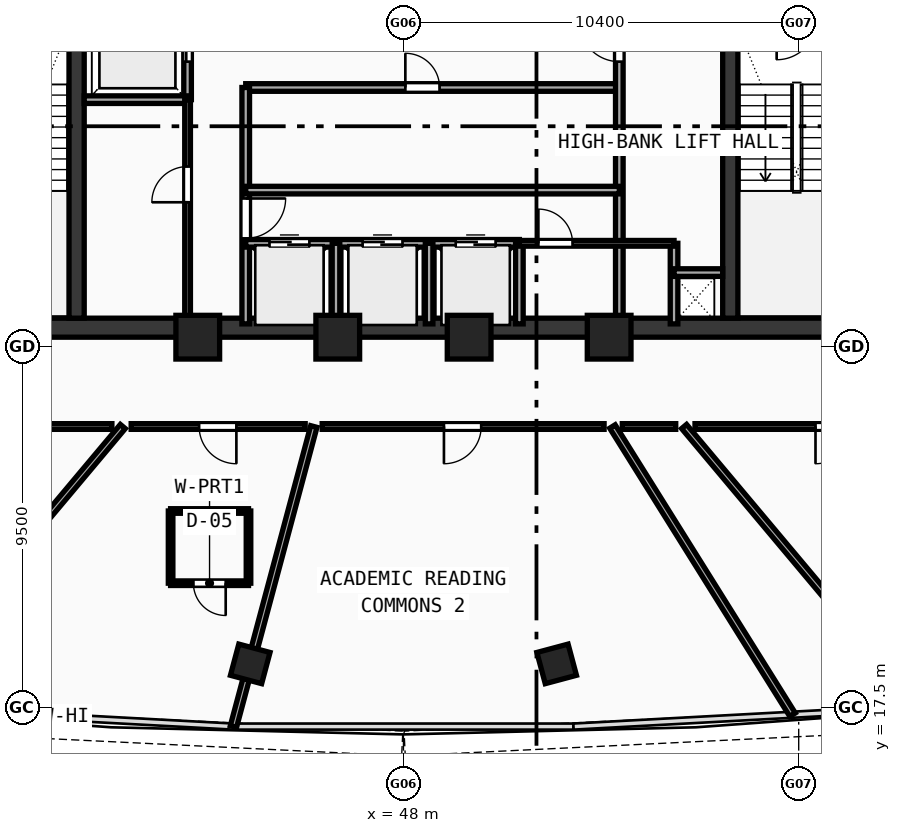
"""IFC4 building model, lengths in metres.
Left out: names, types, materials, properties, quantities, classifications, styles, units other than length and angle.
Written with IfcOpenShell. Run it as: python <this file> out.ifc"""

import sys

from ifc_helpers import new_model, si_unit, direction, frame, frame_2d, origin, origin_with_axes, origin_2d, place, context, subcontext, project, spatial, rectangle, hollow_rectangle, extrude, source, transform, mapped, element, fill, save


model = new_model("IFC4")
c1 = context("Model", 3, precision=1e-05, world=origin(), true_north=direction((0.0, 1.0)))
c2 = subcontext(c1, "Body", "Model", "MODEL_VIEW")
j1 = project(units=[si_unit("LENGTHUNIT", "METRE"), si_unit("PLANEANGLEUNIT", "RADIAN")], contexts=[c1])
p1 = place(None, origin())
s1 = spatial("IfcSite", under=j1, at=p1, CompositionType="ELEMENT")
p2 = place(p1, origin())
s2 = spatial("IfcBuilding", under=s1, at=p2, CompositionType="ELEMENT")
p3 = place(p2, frame((0.0, 0.0, 255.72)))
s3 = spatial("IfcBuildingStorey", under=s2, at=p3, CompositionType="ELEMENT", Elevation=255.72)
p4 = place(p3, frame((35.55, 27.5, 0.0), z_axis=(0.0, 0.0, 1.0), x_axis=(1.0, 0.0, 0.0)))
e1 = element("IfcWall", 1, at=p4, inside=s3, PredefinedType="SHEAR", context=c2, shape_type="SweptSolid", body=[
    extrude(rectangle(XDim=24.9, YDim=0.5, at=frame_2d((12.45, 0.0))), origin(), (0.0, 0.0, 1.0), 3.47),
])
p5 = place(p3, frame((39.4, 27.75, 0.0), z_axis=(0.0, 0.0, 1.0), x_axis=(0.0, 1.0, 0.0)))
e2 = element("IfcWall", 2, at=p5, inside=s3, PredefinedType="SHEAR", context=c2, shape_type="SweptSolid", body=[
    extrude(rectangle(XDim=12.2, YDim=0.4, at=frame_2d((6.1, 0.0))), origin(), (0.0, 0.0, 1.0), 3.47),
])
p6 = place(p5, frame((10.0, 0.0, 0.0)))
e3 = element("IfcOpeningElement", 3, at=p6, cuts=e2, PredefinedType="OPENING", context=c2, shape_type="SweptSolid", body=[
    extrude(rectangle(XDim=1.1, YDim=2.1, at=frame_2d((0.55, 1.05))), frame((0.0, 0.21, 0.0), z_axis=(0.0, -1.0, 0.0), x_axis=(1.0, 0.0, 0.0)), (0.0, 0.0, 1.0), 0.42),
])
p7 = place(p3, frame((56.6, 27.75, 0.0), z_axis=(0.0, 0.0, 1.0), x_axis=(0.0, 1.0, 0.0)))
e4 = element("IfcWall", 4, at=p7, inside=s3, PredefinedType="SHEAR", context=c2, shape_type="SweptSolid", body=[
    extrude(rectangle(XDim=12.2, YDim=0.4, at=frame_2d((6.1, 0.0))), origin(), (0.0, 0.0, 1.0), 3.47),
])
p8 = place(p7, frame((10.0, 0.0, 0.0)))
e5 = element("IfcOpeningElement", 5, at=p8, cuts=e4, PredefinedType="OPENING", context=c2, shape_type="SweptSolid", body=[
    extrude(rectangle(XDim=1.1, YDim=2.1, at=frame_2d((0.55, 1.05))), frame((0.0, 0.21, 0.0), z_axis=(0.0, -1.0, 0.0), x_axis=(1.0, 0.0, 0.0)), (0.0, 0.0, 1.0), 0.42),
])
m1 = source(origin(), c2, "Body", "SweptSolid", [
    extrude(hollow_rectangle(XDim=1.15, YDim=1.15, WallThickness=0.048, at=origin_2d()), origin(), (0.0, 0.0, 1.0), 3.73),
])
for number, where, z_axis, x_axis in (
    (6, (42.588, 27.25, -0.26), (0.0, 0.0, 1.0), (1.0, 0.0, 0.0)),
    (7, (46.272, 27.25, -0.26), (0.0, 0.0, 1.0), (1.0, 0.0, 0.0)),
    (8, (49.729, 27.25, -0.26), (0.0, 0.0, 1.0), (1.0, 0.0, 0.0)),
    (9, (53.412, 27.25, -0.26), (0.0, 0.0, 1.0), (1.0, 0.0, 0.0)),
):
    element("IfcColumn", number, at=place(p3, frame(where, z_axis=z_axis, x_axis=x_axis)), inside=s3, PredefinedType="COLUMN", context=c2, shape_type="MappedRepresentation", body=[
        mapped(m1, transform((0.0, 0.0, 0.0), scale=1.0)),
    ])
m2 = source(origin(), c2, "Body", "SweptSolid", [
    extrude(hollow_rectangle(XDim=0.85, YDim=0.85, WallThickness=0.034, at=origin_2d()), origin(), (0.0, 0.0, 1.0), 3.73),
])
for number, where, z_axis, x_axis in (
    (10, (43.969, 18.654, -0.26), (0.0, 0.0, 1.0), (0.966, -0.259, 0.0)),
    (11, (52.031, 18.654, -0.26), (0.0, 0.0, 1.0), (0.966, 0.259, 0.0)),
):
    element("IfcColumn", number, at=place(p3, frame(where, z_axis=z_axis, x_axis=x_axis)), inside=s3, PredefinedType="COLUMN", context=c2, shape_type="MappedRepresentation", body=[
        mapped(m2, transform((0.0, 0.0, 0.0), scale=1.0)),
    ])
p9 = place(p3, frame((42.32, 33.5, 0.0), z_axis=(0.0, 0.0, 1.0), x_axis=(0.0, 1.0, 0.0)))
e12 = element("IfcWall", 12, at=p9, inside=s3, PredefinedType="SOLIDWALL", context=c2, shape_type="SweptSolid", body=[
    extrude(rectangle(XDim=6.45, YDim=0.2, at=frame_2d((3.225, 0.0))), origin(), (0.0, 0.0, 1.0), 3.47),
])
p10 = place(p9, frame((1.0, 0.0, 0.0)))
e13 = element("IfcOpeningElement", 13, at=p10, cuts=e12, PredefinedType="OPENING", context=c2, shape_type="SweptSolid", body=[
    extrude(rectangle(XDim=1.05, YDim=2.1, at=frame_2d((0.525, 1.05))), frame((0.0, 0.11, 0.0), z_axis=(0.0, -1.0, 0.0), x_axis=(1.0, 0.0, 0.0)), (0.0, 0.0, 1.0), 0.22),
])
p11 = place(p3, frame((39.6, 33.5, 0.0), z_axis=(0.0, 0.0, 1.0), x_axis=(1.0, 0.0, 0.0)))
e14 = element("IfcWall", 14, at=p11, inside=s3, PredefinedType="SOLIDWALL", context=c2, shape_type="SweptSolid", body=[
    extrude(rectangle(XDim=2.72, YDim=0.2, at=frame_2d((1.36, 0.0))), origin(), (0.0, 0.0, 1.0), 3.47),
])
p12 = place(p3, frame((43.85, 33.82, 0.0), z_axis=(0.0, 0.0, 1.0), x_axis=(1.0, 0.0, 0.0)))
e15 = element("IfcWall", 15, at=p12, inside=s3, PredefinedType="SOLIDWALL", context=c2, shape_type="SweptSolid", body=[
    extrude(rectangle(XDim=9.83, YDim=0.2, at=frame_2d((4.915, 0.0))), origin(), (0.0, 0.0, 1.0), 3.47),
])
p13 = place(p12, frame((4.2, 0.0, 0.0)))
e16 = element("IfcOpeningElement", 16, at=p13, cuts=e15, PredefinedType="OPENING", context=c2, shape_type="SweptSolid", body=[
    extrude(rectangle(XDim=0.9, YDim=2.1, at=frame_2d((0.45, 1.05))), frame((0.0, 0.11, 0.0), z_axis=(0.0, -1.0, 0.0), x_axis=(1.0, 0.0, 0.0)), (0.0, 0.0, 1.0), 0.22),
])
p14 = place(p3, frame((43.85, 27.6, 0.0), z_axis=(0.0, 0.0, 1.0), x_axis=(0.0, 1.0, 0.0)))
e17 = element("IfcWall", 17, at=p14, inside=s3, PredefinedType="SOLIDWALL", context=c2, shape_type="SweptSolid", body=[
    extrude(rectangle(XDim=6.22, YDim=0.2, at=frame_2d((3.11, 0.0))), origin(), (0.0, 0.0, 1.0), 3.47),
])
p15 = place(p14, frame((2.25, 0.0, 0.0)))
e18 = element("IfcOpeningElement", 18, at=p15, cuts=e17, PredefinedType="OPENING", context=c2, shape_type="SweptSolid", body=[
    extrude(rectangle(XDim=1.05, YDim=2.1, at=frame_2d((0.525, 1.05))), frame((0.0, 0.11, 0.0), z_axis=(0.0, -1.0, 0.0), x_axis=(1.0, 0.0, 0.0)), (0.0, 0.0, 1.0), 0.22),
])
p16 = place(p3, frame((53.68, 27.6, 0.0), z_axis=(0.0, 0.0, 1.0), x_axis=(0.0, 1.0, 0.0)))
e19 = element("IfcWall", 19, at=p16, inside=s3, PredefinedType="SOLIDWALL", context=c2, shape_type="SweptSolid", body=[
    extrude(rectangle(XDim=9.05, YDim=0.2, at=frame_2d((4.525, 0.0))), origin(), (0.0, 0.0, 1.0), 3.47),
])
p17 = place(p16, frame((6.9, 0.0, 0.0)))
e20 = element("IfcOpeningElement", 20, at=p17, cuts=e19, PredefinedType="OPENING", context=c2, shape_type="SweptSolid", body=[
    extrude(rectangle(XDim=1.05, YDim=2.1, at=frame_2d((0.525, 1.05))), frame((0.0, 0.11, 0.0), z_axis=(0.0, -1.0, 0.0), x_axis=(1.0, 0.0, 0.0)), (0.0, 0.0, 1.0), 0.22),
])
p18 = place(p3, frame((43.85, 29.72, 0.0), z_axis=(0.0, 0.0, 1.0), x_axis=(1.0, 0.0, 0.0)))
e21 = element("IfcWall", 21, at=p18, inside=s3, PredefinedType="SOLIDWALL", context=c2, shape_type="SweptSolid", body=[
    extrude(rectangle(XDim=7.2, YDim=0.2, at=frame_2d((3.6, 0.0))), origin(), (0.0, 0.0, 1.0), 3.47),
])
p19 = place(p18, frame((0.625, 0.0, 0.0)))
e22 = element("IfcOpeningElement", 22, at=p19, cuts=e21, PredefinedType="OPENING", context=c2, shape_type="SweptSolid", body=[
    extrude(rectangle(XDim=1.05, YDim=2.1, at=frame_2d((0.525, 1.05))), frame((0.0, 0.11, 0.0), z_axis=(0.0, -1.0, 0.0), x_axis=(1.0, 0.0, 0.0)), (0.0, 0.0, 1.0), 0.22),
])
p20 = place(p18, frame((3.075, 0.0, 0.0)))
e23 = element("IfcOpeningElement", 23, at=p20, cuts=e21, PredefinedType="OPENING", context=c2, shape_type="SweptSolid", body=[
    extrude(rectangle(XDim=1.05, YDim=2.1, at=frame_2d((0.525, 1.05))), frame((0.0, 0.11, 0.0), z_axis=(0.0, -1.0, 0.0), x_axis=(1.0, 0.0, 0.0)), (0.0, 0.0, 1.0), 0.22),
])
p21 = place(p18, frame((5.525, 0.0, 0.0)))
e24 = element("IfcOpeningElement", 24, at=p21, cuts=e21, PredefinedType="OPENING", context=c2, shape_type="SweptSolid", body=[
    extrude(rectangle(XDim=1.05, YDim=2.1, at=frame_2d((0.525, 1.05))), frame((0.0, 0.11, 0.0), z_axis=(0.0, -1.0, 0.0), x_axis=(1.0, 0.0, 0.0)), (0.0, 0.0, 1.0), 0.22),
])
p22 = place(p3, frame((51.05, 27.6, 0.0), z_axis=(0.0, 0.0, 1.0), x_axis=(0.0, 1.0, 0.0)))
e25 = element("IfcWall", 25, at=p22, inside=s3, PredefinedType="SOLIDWALL", context=c2, shape_type="SweptSolid", body=[
    extrude(rectangle(XDim=2.12, YDim=0.2, at=frame_2d((1.06, 0.0))), origin(), (0.0, 0.0, 1.0), 3.47),
])
p23 = place(p3, frame((43.85, 31.12, 0.0), z_axis=(0.0, 0.0, 1.0), x_axis=(1.0, 0.0, 0.0)))
e26 = element("IfcWall", 26, at=p23, inside=s3, PredefinedType="SOLIDWALL", context=c2, shape_type="SweptSolid", body=[
    extrude(rectangle(XDim=9.83, YDim=0.2, at=frame_2d((4.915, 0.0))), origin(), (0.0, 0.0, 1.0), 3.47),
])
for number, where, z_axis, x_axis in (
    (27, (46.225, 27.6, 0.0), (0.0, 0.0, 1.0), (0.0, 1.0, 0.0)),
    (28, (48.675, 27.6, 0.0), (0.0, 0.0, 1.0), (0.0, 1.0, 0.0)),
    (29, (55.12, 27.6, 0.0), (0.0, 0.0, 1.0), (0.0, 1.0, 0.0)),
):
    element("IfcWall", number, at=place(p3, frame(where, z_axis=z_axis, x_axis=x_axis)), inside=s3, PredefinedType="SOLIDWALL", context=c2, shape_type="SweptSolid", body=[
        extrude(rectangle(XDim=2.12, YDim=0.2, at=frame_2d((1.06, 0.0))), origin(), (0.0, 0.0, 1.0), 3.47),
    ])
p24 = place(p3, frame((55.12, 28.95, 0.0), z_axis=(0.0, 0.0, 1.0), x_axis=(1.0, 0.0, 0.0)))
e30 = element("IfcWall", 30, at=p24, inside=s3, PredefinedType="SOLIDWALL", context=c2, shape_type="SweptSolid", body=[
    extrude(rectangle(XDim=1.28, YDim=0.2, at=frame_2d((0.64, 0.0))), origin(), (0.0, 0.0, 1.0), 3.47),
])
p25 = place(p3, frame((42.32, 27.6, 0.0), z_axis=(0.0, 0.0, 1.0), x_axis=(0.0, 1.0, 0.0)))
e31 = element("IfcWall", 31, at=p25, inside=s3, PredefinedType="PARTITIONING", context=c2, shape_type="SweptSolid", body=[
    extrude(rectangle(XDim=5.9, YDim=0.15, at=frame_2d((2.95, 0.0))), origin(), (0.0, 0.0, 1.0), 3.47),
])
p26 = place(p25, frame((3.2, 0.0, 0.0)))
e32 = element("IfcOpeningElement", 32, at=p26, cuts=e31, PredefinedType="OPENING", context=c2, shape_type="SweptSolid", body=[
    extrude(rectangle(XDim=0.94, YDim=2.1, at=frame_2d((0.47, 1.05))), frame((0.0, 0.085, 0.0), z_axis=(0.0, -1.0, 0.0), x_axis=(1.0, 0.0, 0.0)), (0.0, 0.0, 1.0), 0.17),
])
p27 = place(p3, frame((51.05, 29.72, 0.0), z_axis=(0.0, 0.0, 1.0), x_axis=(1.0, 0.0, 0.0)))
e33 = element("IfcWall", 33, at=p27, inside=s3, PredefinedType="PARTITIONING", context=c2, shape_type="SweptSolid", body=[
    extrude(rectangle(XDim=4.07, YDim=0.15, at=frame_2d((2.035, 0.0))), origin(), (0.0, 0.0, 1.0), 3.47),
])
p28 = place(p27, frame((0.5, 0.0, 0.0)))
e34 = element("IfcOpeningElement", 34, at=p28, cuts=e33, PredefinedType="OPENING", context=c2, shape_type="SweptSolid", body=[
    extrude(rectangle(XDim=0.9, YDim=2.1, at=frame_2d((0.45, 1.05))), frame((0.0, 0.085, 0.0), z_axis=(0.0, -1.0, 0.0), x_axis=(1.0, 0.0, 0.0)), (0.0, 0.0, 1.0), 0.17),
])
p29 = place(p3, frame((40.616, 24.9, 0.0), z_axis=(0.0, 0.0, 1.0), x_axis=(-0.642795010628, -0.766038232931, 0.0)))
e35 = element("IfcWall", 35, at=p29, inside=s3, PredefinedType="PARTITIONING", context=c2, shape_type="SweptSolid", body=[
    extrude(rectangle(XDim=9.663, YDim=0.17, at=frame_2d((4.832, 0.0))), origin(), (0.0, 0.0, 1.0), 2.82),
])
p30 = place(p3, frame((45.642, 24.9, 0.0), z_axis=(0.0, 0.0, 1.0), x_axis=(-0.258833622746, -0.965921920103, 0.0)))
e36 = element("IfcWall", 36, at=p30, inside=s3, PredefinedType="PARTITIONING", context=c2, shape_type="SweptSolid", body=[
    extrude(rectangle(XDim=8.174, YDim=0.17, at=frame_2d((4.087, 0.0))), origin(), (0.0, 0.0, 1.0), 2.82),
])
p31 = place(p3, frame((53.499, 24.9, 0.0), z_axis=(0.0, 0.0, 1.0), x_axis=(0.529920411872, -0.848047379031, 0.0)))
e37 = element("IfcWall", 37, at=p31, inside=s3, PredefinedType="PARTITIONING", context=c2, shape_type="SweptSolid", body=[
    extrude(rectangle(XDim=8.943, YDim=0.17, at=frame_2d((4.471, 0.0))), origin(), (0.0, 0.0, 1.0), 2.82),
])
p32 = place(p3, frame((55.384, 24.9, 0.0), z_axis=(0.0, 0.0, 1.0), x_axis=(0.642795010628, -0.766038232931, 0.0)))
e38 = element("IfcWall", 38, at=p32, inside=s3, PredefinedType="PARTITIONING", context=c2, shape_type="SweptSolid", body=[
    extrude(rectangle(XDim=9.663, YDim=0.17, at=frame_2d((4.832, 0.0))), origin(), (0.0, 0.0, 1.0), 2.82),
])
p33 = place(p3, frame((62.85, 24.9, 0.0), z_axis=(0.0, 0.0, 1.0), x_axis=(-1.0, 0.0, 0.0)))
e39 = element("IfcWall", 39, at=p33, inside=s3, PredefinedType="PARTITIONING", context=c2, shape_type="SweptSolid", body=[
    extrude(rectangle(XDim=7.179, YDim=0.15, at=frame_2d((3.589, 0.0))), origin(), (0.0, 0.0, 1.0), 3.12),
])
p34 = place(p33, frame((3.028, 0.0, 0.0)))
e40 = element("IfcOpeningElement", 40, at=p34, cuts=e39, PredefinedType="OPENING", context=c2, shape_type="SweptSolid", body=[
    extrude(rectangle(XDim=0.98, YDim=2.12, at=frame_2d((0.49, 1.06))), frame((0.0, 0.085, 0.0), z_axis=(0.0, -1.0, 0.0), x_axis=(1.0, 0.0, 0.0)), (0.0, 0.0, 1.0), 0.17),
])
p35 = place(p3, frame((55.164, 24.9, 0.0), z_axis=(0.0, 0.0, 1.0), x_axis=(-1.0, 0.0, 0.0)))
e41 = element("IfcWall", 41, at=p35, inside=s3, PredefinedType="PARTITIONING", context=c2, shape_type="SweptSolid", body=[
    extrude(rectangle(XDim=1.406, YDim=0.15, at=frame_2d((0.703, 0.0))), origin(), (0.0, 0.0, 1.0), 2.82),
])
p36 = place(p3, frame((53.279, 24.9, 0.0), z_axis=(0.0, 0.0, 1.0), x_axis=(-1.0, 0.0, 0.0)))
e42 = element("IfcWall", 42, at=p36, inside=s3, PredefinedType="PARTITIONING", context=c2, shape_type="SweptSolid", body=[
    extrude(rectangle(XDim=7.417, YDim=0.15, at=frame_2d((3.708, 0.0))), origin(), (0.0, 0.0, 1.0), 2.82),
])
p37 = place(p36, frame((3.234, 0.0, 0.0)))
e43 = element("IfcOpeningElement", 43, at=p37, cuts=e42, PredefinedType="OPENING", context=c2, shape_type="SweptSolid", body=[
    extrude(rectangle(XDim=0.98, YDim=2.12, at=frame_2d((0.49, 1.06))), frame((0.0, 0.085, 0.0), z_axis=(0.0, -1.0, 0.0), x_axis=(1.0, 0.0, 0.0)), (0.0, 0.0, 1.0), 0.17),
])
p38 = place(p3, frame((45.414, 24.9, 0.0), z_axis=(0.0, 0.0, 1.0), x_axis=(-1.0, 0.0, 0.0)))
e44 = element("IfcWall", 44, at=p38, inside=s3, PredefinedType="PARTITIONING", context=c2, shape_type="SweptSolid", body=[
    extrude(rectangle(XDim=4.579, YDim=0.15, at=frame_2d((2.289, 0.0))), origin(), (0.0, 0.0, 1.0), 2.82),
])
p39 = place(p38, frame((1.81, 0.0, 0.0)))
e45 = element("IfcOpeningElement", 45, at=p39, cuts=e44, PredefinedType="OPENING", context=c2, shape_type="SweptSolid", body=[
    extrude(rectangle(XDim=0.98, YDim=2.12, at=frame_2d((0.49, 1.06))), frame((0.0, 0.085, 0.0), z_axis=(0.0, -1.0, 0.0), x_axis=(1.0, 0.0, 0.0)), (0.0, 0.0, 1.0), 0.17),
])
p40 = place(p3, frame((40.329, 24.9, 0.0), z_axis=(0.0, 0.0, 1.0), x_axis=(-1.0, 0.0, 0.0)))
e46 = element("IfcWall", 46, at=p40, inside=s3, PredefinedType="PARTITIONING", context=c2, shape_type="SweptSolid", body=[
    extrude(rectangle(XDim=7.179, YDim=0.15, at=frame_2d((3.589, 0.0))), origin(), (0.0, 0.0, 1.0), 3.12),
])
p41 = place(p40, frame((3.201, 0.0, 0.0)))
e47 = element("IfcOpeningElement", 47, at=p41, cuts=e46, PredefinedType="OPENING", context=c2, shape_type="SweptSolid", body=[
    extrude(rectangle(XDim=0.98, YDim=2.12, at=frame_2d((0.49, 1.06))), frame((0.0, 0.085, 0.0), z_axis=(0.0, -1.0, 0.0), x_axis=(1.0, 0.0, 0.0)), (0.0, 0.0, 1.0), 0.17),
])
p42 = place(p3, frame((41.873, 20.777, 0.0), z_axis=(0.0, 0.0, 1.0), x_axis=(1.0, 0.0, 0.0)))
e48 = element("IfcWall", 48, at=p42, inside=s3, PredefinedType="PARTITIONING", context=c2, shape_type="SweptSolid", body=[
    extrude(rectangle(XDim=2.05, YDim=0.12, at=frame_2d((1.025, 0.0))), origin(), (0.0, 0.0, 1.0), 3.47),
])
p43 = place(p42, frame((0.6, 0.0, 0.0)))
e49 = element("IfcOpeningElement", 49, at=p43, cuts=e48, PredefinedType="OPENING", context=c2, shape_type="SweptSolid", body=[
    extrude(rectangle(XDim=0.85, YDim=2.1, at=frame_2d((0.425, 1.05))), frame((0.0, 0.07, 0.0), z_axis=(0.0, -1.0, 0.0), x_axis=(1.0, 0.0, 0.0)), (0.0, 0.0, 1.0), 0.14),
])
p44 = place(p3, frame((43.923, 20.777, 0.0), z_axis=(0.0, 0.0, 1.0), x_axis=(0.0, 1.0, 0.0)))
e50 = element("IfcWall", 50, at=p44, inside=s3, PredefinedType="PARTITIONING", context=c2, shape_type="SweptSolid", body=[
    extrude(rectangle(XDim=1.9, YDim=0.12, at=frame_2d((0.95, 0.0))), origin(), (0.0, 0.0, 1.0), 3.12),
])
p45 = place(p3, frame((43.923, 22.677, 0.0), z_axis=(0.0, 0.0, 1.0), x_axis=(-1.0, 0.0, 0.0)))
e51 = element("IfcWall", 51, at=p45, inside=s3, PredefinedType="PARTITIONING", context=c2, shape_type="SweptSolid", body=[
    extrude(rectangle(XDim=2.05, YDim=0.12, at=frame_2d((1.025, 0.0))), origin(), (0.0, 0.0, 1.0), 3.47),
])
p46 = place(p3, frame((41.873, 22.677, 0.0), z_axis=(0.0, 0.0, 1.0), x_axis=(0.0, -1.0, 0.0)))
e52 = element("IfcWall", 52, at=p46, inside=s3, PredefinedType="PARTITIONING", context=c2, shape_type="SweptSolid", body=[
    extrude(rectangle(XDim=1.9, YDim=0.12, at=frame_2d((0.95, 0.0))), origin(), (0.0, 0.0, 1.0), 3.12),
])
m3 = source(origin(), c2, "Body", "SweptSolid", [
    extrude(rectangle(XDim=1.05, YDim=2.1, at=frame_2d((0.525, 1.05))), frame((0.0, 0.025, 0.0), z_axis=(0.0, -1.0, 0.0), x_axis=(1.0, 0.0, 0.0)), (0.0, 0.0, 1.0), 0.05),
])
p47 = place(p10, origin_with_axes())
e53 = element("IfcDoor", 53, at=p47, inside=s3, OperationType="DOUBLE_DOOR_SLIDING", PredefinedType="DOOR", context=c2, shape_type="MappedRepresentation", body=[
    mapped(m3, transform((0.0, 0.0, 0.0), scale=1.0)),
])
fill(e13, e53)
m4 = source(origin(), c2, "Body", "SweptSolid", [
    extrude(rectangle(XDim=0.9, YDim=2.1, at=frame_2d((0.45, 1.05))), frame((0.0, 0.025, 0.0), z_axis=(0.0, -1.0, 0.0), x_axis=(1.0, 0.0, 0.0)), (0.0, 0.0, 1.0), 0.05),
])
p48 = place(p13, origin_with_axes())
e54 = element("IfcDoor", 54, at=p48, inside=s3, OperationType="SINGLE_SWING_LEFT", PredefinedType="DOOR", context=c2, shape_type="MappedRepresentation", body=[
    mapped(m4, transform((0.0, 0.0, 0.0), scale=1.0)),
])
fill(e16, e54)
p49 = place(p15, frame((1.05, 0.0, 0.0), z_axis=(0.0, 0.0, 1.0), x_axis=(-1.0, 0.0, 0.0)))
e55 = element("IfcDoor", 55, at=p49, inside=s3, OperationType="SINGLE_SWING_LEFT", PredefinedType="DOOR", context=c2, shape_type="MappedRepresentation", body=[
    mapped(m3, transform((0.0, 0.0, 0.0), scale=1.0)),
])
fill(e18, e55)
p50 = place(p17, origin_with_axes())
e56 = element("IfcDoor", 56, at=p50, inside=s3, OperationType="SINGLE_SWING_RIGHT", PredefinedType="DOOR", context=c2, shape_type="MappedRepresentation", body=[
    mapped(m3, transform((0.0, 0.0, 0.0), scale=1.0)),
])
fill(e20, e56)
p51 = place(p19, origin_with_axes())
e57 = element("IfcDoor", 57, at=p51, inside=s3, OperationType="DOUBLE_DOOR_SLIDING", PredefinedType="DOOR", context=c2, shape_type="MappedRepresentation", body=[
    mapped(m3, transform((0.0, 0.0, 0.0), scale=1.0)),
])
fill(e22, e57)
p52 = place(p20, origin_with_axes())
e58 = element("IfcDoor", 58, at=p52, inside=s3, OperationType="DOUBLE_DOOR_SLIDING", PredefinedType="DOOR", context=c2, shape_type="MappedRepresentation", body=[
    mapped(m3, transform((0.0, 0.0, 0.0), scale=1.0)),
])
fill(e23, e58)
p53 = place(p21, origin_with_axes())
e59 = element("IfcDoor", 59, at=p53, inside=s3, OperationType="DOUBLE_DOOR_SLIDING", PredefinedType="DOOR", context=c2, shape_type="MappedRepresentation", body=[
    mapped(m3, transform((0.0, 0.0, 0.0), scale=1.0)),
])
fill(e24, e59)
m5 = source(origin(), c2, "Body", "SweptSolid", [
    extrude(rectangle(XDim=0.94, YDim=2.1, at=frame_2d((0.47, 1.05))), frame((0.0, 0.025, 0.0), z_axis=(0.0, -1.0, 0.0), x_axis=(1.0, 0.0, 0.0)), (0.0, 0.0, 1.0), 0.05),
])
p54 = place(p26, origin_with_axes())
e60 = element("IfcDoor", 60, at=p54, inside=s3, OperationType="SINGLE_SWING_LEFT", PredefinedType="DOOR", context=c2, shape_type="MappedRepresentation", body=[
    mapped(m5, transform((0.0, 0.0, 0.0), scale=1.0)),
])
fill(e32, e60)
p55 = place(p28, origin_with_axes())
e61 = element("IfcDoor", 61, at=p55, inside=s3, OperationType="SINGLE_SWING_LEFT", PredefinedType="DOOR", context=c2, shape_type="MappedRepresentation", body=[
    mapped(m4, transform((0.0, 0.0, 0.0), scale=1.0)),
])
fill(e34, e61)
m6 = source(origin(), c2, "Body", "SweptSolid", [
    extrude(rectangle(XDim=0.98, YDim=2.12, at=frame_2d((0.49, 1.06))), frame((0.0, 0.025, 0.0), z_axis=(0.0, -1.0, 0.0), x_axis=(1.0, 0.0, 0.0)), (0.0, 0.0, 1.0), 0.05),
])
p56 = place(p39, origin_with_axes())
e62 = element("IfcDoor", 62, at=p56, inside=s3, OperationType="SINGLE_SWING_LEFT", PredefinedType="DOOR", context=c2, shape_type="MappedRepresentation", body=[
    mapped(m6, transform((0.0, 0.0, 0.0), scale=1.0)),
])
fill(e45, e62)
m7 = source(origin(), c2, "Body", "SweptSolid", [
    extrude(rectangle(XDim=0.85, YDim=2.1, at=frame_2d((0.425, 1.05))), frame((0.0, 0.025, 0.0), z_axis=(0.0, -1.0, 0.0), x_axis=(1.0, 0.0, 0.0)), (0.0, 0.0, 1.0), 0.05),
])
p57 = place(p43, frame((0.85, 0.0, 0.0), z_axis=(0.0, 0.0, 1.0), x_axis=(-1.0, 0.0, 0.0)))
e63 = element("IfcDoor", 63, at=p57, inside=s3, OperationType="SINGLE_SWING_LEFT", PredefinedType="DOOR", context=c2, shape_type="MappedRepresentation", body=[
    mapped(m7, transform((0.0, 0.0, 0.0), scale=1.0)),
])
fill(e49, e63)
p58 = place(p37, origin_with_axes())
e64 = element("IfcDoor", 64, at=p58, inside=s3, OperationType="SINGLE_SWING_RIGHT", PredefinedType="DOOR", context=c2, shape_type="MappedRepresentation", body=[
    mapped(m6, transform((0.0, 0.0, 0.0), scale=1.0)),
])
fill(e43, e64)
p59 = place(p34, origin_with_axes())
e65 = element("IfcDoor", 65, at=p59, inside=s3, OperationType="SINGLE_SWING_RIGHT", PredefinedType="DOOR", context=c2, shape_type="MappedRepresentation", body=[
    mapped(m6, transform((0.0, 0.0, 0.0), scale=1.0)),
])
fill(e40, e65)
save(model, sys.argv[1])
